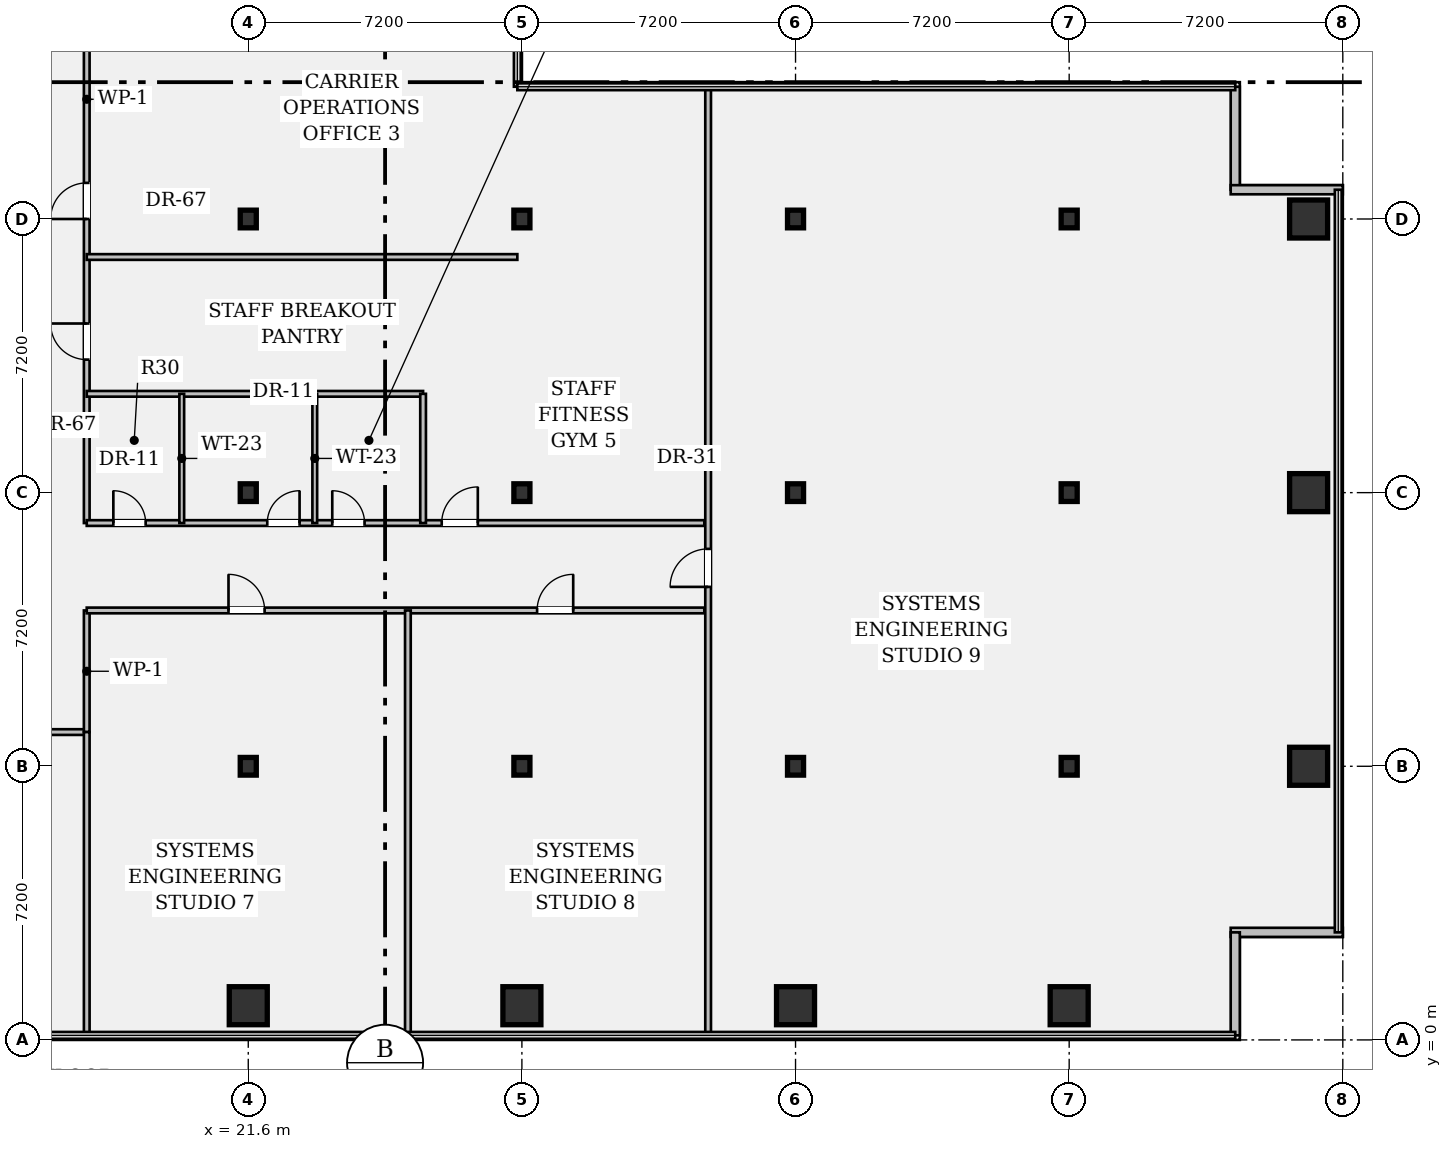
"""IFC4 building model, lengths in metres.
Left out: names, types, materials, properties, quantities, classifications, styles, units other than length and angle.
Written with IfcOpenShell. Run it as: python <this file> out.ifc"""

import sys

from ifc_helpers import new_model, si_unit, direction, frame, frame_2d, origin, origin_2d, place, context, subcontext, project, spatial, rectangle, hollow_rectangle, i_section, extrude, element, fill, save


model = new_model("IFC4")
c1 = context("Model", 3, precision=1e-05, world=origin(), true_north=direction((0.0, 1.0)))
c2 = subcontext(c1, "Body", "Model", "MODEL_VIEW")
j1 = project(units=[si_unit("LENGTHUNIT", "METRE"), si_unit("PLANEANGLEUNIT", "RADIAN")], contexts=[c1])
p1 = place(None, origin())
s1 = spatial("IfcSite", under=j1, at=p1, CompositionType="ELEMENT")
p2 = place(p1, origin())
s2 = spatial("IfcBuilding", under=s1, at=p2, CompositionType="ELEMENT")
p3 = place(p2, frame((0.0, 0.0, 61.95)))
s3 = spatial("IfcBuildingStorey", under=s2, at=p3, CompositionType="ELEMENT", Elevation=61.95)
p4 = place(p3, frame((21.6, 0.9, 0.0), z_axis=(0.0, 0.0, 1.0), x_axis=(1.0, 0.0, 0.0)))
e1 = element("IfcColumn", 1, at=p4, inside=s3, PredefinedType="COLUMN", context=c2, shape_type="SweptSolid", body=[
    extrude(hollow_rectangle(XDim=1.0, YDim=1.0, WallThickness=0.065, at=origin_2d()), origin(), (0.0, 0.0, 1.0), 3.57),
])
for number, where, z_axis, x_axis in (
    (2, (21.6, 7.2, 0.0), (0.0, 0.0, 1.0), (1.0, 0.0, 0.0)),
    (3, (21.6, 14.4, 0.0), (0.0, 0.0, 1.0), (1.0, 0.0, 0.0)),
    (4, (21.6, 21.6, 0.0), (0.0, 0.0, 1.0), (1.0, 0.0, 0.0)),
):
    element("IfcColumn", number, at=place(p3, frame(where, z_axis=z_axis, x_axis=x_axis)), inside=s3, PredefinedType="COLUMN", context=c2, shape_type="SweptSolid", body=[
        extrude(i_section(OverallWidth=0.422, OverallDepth=0.465, WebThickness=0.045, FlangeThickness=0.073, FilletRadius=0.018, at=origin_2d()), origin(), (0.0, 0.0, 1.0), 3.57),
    ])
p5 = place(p3, frame((28.8, 0.9, 0.0), z_axis=(0.0, 0.0, 1.0), x_axis=(1.0, 0.0, 0.0)))
e5 = element("IfcColumn", 5, at=p5, inside=s3, PredefinedType="COLUMN", context=c2, shape_type="SweptSolid", body=[
    extrude(hollow_rectangle(XDim=1.0, YDim=1.0, WallThickness=0.065, at=origin_2d()), origin(), (0.0, 0.0, 1.0), 3.57),
])
for number, where, z_axis, x_axis in (
    (6, (28.8, 7.2, 0.0), (0.0, 0.0, 1.0), (1.0, 0.0, 0.0)),
    (7, (28.8, 14.4, 0.0), (0.0, 0.0, 1.0), (1.0, 0.0, 0.0)),
    (8, (28.8, 21.6, 0.0), (0.0, 0.0, 1.0), (1.0, 0.0, 0.0)),
):
    element("IfcColumn", number, at=place(p3, frame(where, z_axis=z_axis, x_axis=x_axis)), inside=s3, PredefinedType="COLUMN", context=c2, shape_type="SweptSolid", body=[
        extrude(i_section(OverallWidth=0.422, OverallDepth=0.465, WebThickness=0.045, FlangeThickness=0.073, FilletRadius=0.018, at=origin_2d()), origin(), (0.0, 0.0, 1.0), 3.57),
    ])
p6 = place(p3, frame((36.0, 0.9, 0.0), z_axis=(0.0, 0.0, 1.0), x_axis=(1.0, 0.0, 0.0)))
e9 = element("IfcColumn", 9, at=p6, inside=s3, PredefinedType="COLUMN", context=c2, shape_type="SweptSolid", body=[
    extrude(hollow_rectangle(XDim=1.0, YDim=1.0, WallThickness=0.065, at=origin_2d()), origin(), (0.0, 0.0, 1.0), 3.57),
])
for number, where, z_axis, x_axis in (
    (10, (36.0, 7.2, 0.0), (0.0, 0.0, 1.0), (1.0, 0.0, 0.0)),
    (11, (36.0, 14.4, 0.0), (0.0, 0.0, 1.0), (1.0, 0.0, 0.0)),
    (12, (36.0, 21.6, 0.0), (0.0, 0.0, 1.0), (1.0, 0.0, 0.0)),
):
    element("IfcColumn", number, at=place(p3, frame(where, z_axis=z_axis, x_axis=x_axis)), inside=s3, PredefinedType="COLUMN", context=c2, shape_type="SweptSolid", body=[
        extrude(i_section(OverallWidth=0.422, OverallDepth=0.465, WebThickness=0.045, FlangeThickness=0.073, FilletRadius=0.018, at=origin_2d()), origin(), (0.0, 0.0, 1.0), 3.57),
    ])
p7 = place(p3, frame((43.2, 0.9, 0.0), z_axis=(0.0, 0.0, 1.0), x_axis=(1.0, 0.0, 0.0)))
e13 = element("IfcColumn", 13, at=p7, inside=s3, PredefinedType="COLUMN", context=c2, shape_type="SweptSolid", body=[
    extrude(hollow_rectangle(XDim=1.0, YDim=1.0, WallThickness=0.065, at=origin_2d()), origin(), (0.0, 0.0, 1.0), 3.57),
])
for number, where, z_axis, x_axis in (
    (14, (43.2, 7.2, 0.0), (0.0, 0.0, 1.0), (1.0, 0.0, 0.0)),
    (15, (43.2, 14.4, 0.0), (0.0, 0.0, 1.0), (1.0, 0.0, 0.0)),
    (16, (43.2, 21.6, 0.0), (0.0, 0.0, 1.0), (1.0, 0.0, 0.0)),
):
    element("IfcColumn", number, at=place(p3, frame(where, z_axis=z_axis, x_axis=x_axis)), inside=s3, PredefinedType="COLUMN", context=c2, shape_type="SweptSolid", body=[
        extrude(i_section(OverallWidth=0.422, OverallDepth=0.465, WebThickness=0.045, FlangeThickness=0.073, FilletRadius=0.018, at=origin_2d()), origin(), (0.0, 0.0, 1.0), 3.57),
    ])
for number, where, z_axis, x_axis in (
    (17, (49.5, 7.2, 0.0), (0.0, 0.0, 1.0), (1.0, 0.0, 0.0)),
    (18, (49.5, 14.4, 0.0), (0.0, 0.0, 1.0), (1.0, 0.0, 0.0)),
    (19, (49.5, 21.6, 0.0), (0.0, 0.0, 1.0), (1.0, 0.0, 0.0)),
):
    element("IfcColumn", number, at=place(p3, frame(where, z_axis=z_axis, x_axis=x_axis)), inside=s3, PredefinedType="COLUMN", context=c2, shape_type="SweptSolid", body=[
        extrude(hollow_rectangle(XDim=1.0, YDim=1.0, WallThickness=0.065, at=origin_2d()), origin(), (0.0, 0.0, 1.0), 3.57),
    ])
p8 = place(p3, frame((47.57, 25.08, 0.0), z_axis=(0.0, 0.0, 1.0), x_axis=(0.0, -1.0, 0.0)))
e20 = element("IfcWall", 20, at=p8, inside=s3, PredefinedType="STANDARD", context=c2, shape_type="SweptSolid", body=[
    extrude(rectangle(XDim=2.71, YDim=0.24, at=frame_2d((1.355, 0.0))), origin(), (0.0, 0.0, 1.0), 3.57),
])
for number, where, z_axis, x_axis in (
    (21, (47.45, 22.37, 0.0), (0.0, 0.0, 1.0), (1.0, 0.0, 0.0)),
    (22, (50.4, 2.83, 0.0), (0.0, 0.0, 1.0), (-1.0, 0.0, 0.0)),
):
    element("IfcWall", number, at=place(p3, frame(where, z_axis=z_axis, x_axis=x_axis)), inside=s3, PredefinedType="STANDARD", context=c2, shape_type="SweptSolid", body=[
        extrude(rectangle(XDim=2.95, YDim=0.24, at=frame_2d((1.475, 0.0))), origin(), (0.0, 0.0, 1.0), 3.57),
    ])
p9 = place(p3, frame((47.57, 2.83, 0.0), z_axis=(0.0, 0.0, 1.0), x_axis=(0.0, -1.0, 0.0)))
e23 = element("IfcWall", 23, at=p9, inside=s3, PredefinedType="STANDARD", context=c2, shape_type="SweptSolid", body=[
    extrude(rectangle(XDim=2.71, YDim=0.24, at=frame_2d((1.355, 0.0))), origin(), (0.0, 0.0, 1.0), 3.57),
])
p10 = place(p3, frame((14.4, 8.1, 0.0), z_axis=(0.0, 0.0, 1.0), x_axis=(1.0, 0.0, 0.0)))
e24 = element("IfcWall", 24, at=p10, inside=s3, PredefinedType="PARTITIONING", context=c2, shape_type="SweptSolid", body=[
    extrude(rectangle(XDim=2.95, YDim=0.15, at=frame_2d((1.475, 0.0))), origin(), (0.0, 0.0, 1.0), 3.088),
])
p11 = place(p10, frame((0.95, 0.0, 0.0)))
e25 = element("IfcOpeningElement", 25, at=p11, cuts=e24, PredefinedType="OPENING", context=c2, shape_type="SweptSolid", body=[
    extrude(rectangle(XDim=0.95, YDim=2.15, at=frame_2d((0.475, 1.075))), frame((0.0, 0.087, 0.0), z_axis=(0.0, -1.0, 0.0), x_axis=(1.0, 0.0, 0.0)), (0.0, 0.0, 1.0), 0.174),
])
p12 = place(p3, frame((17.35, 8.1, 0.0), z_axis=(0.0, 0.0, 1.0), x_axis=(0.0, 1.0, 0.0)))
e26 = element("IfcWall", 26, at=p12, inside=s3, PredefinedType="PARTITIONING", context=c2, shape_type="SweptSolid", body=[
    extrude(rectangle(XDim=3.2, YDim=0.15, at=frame_2d((1.6, 0.0))), origin(), (0.0, 0.0, 1.0), 3.57),
])
p13 = place(p3, frame((17.35, 13.6, 0.0), z_axis=(0.0, 0.0, 1.0), x_axis=(0.0, 1.0, 0.0)))
e27 = element("IfcWall", 27, at=p13, inside=s3, PredefinedType="PARTITIONING", context=c2, shape_type="SweptSolid", body=[
    extrude(rectangle(XDim=22.3, YDim=0.15, at=frame_2d((11.15, 0.0))), origin(), (0.0, 0.0, 1.0), 2.699),
])
p14 = place(p13, frame((4.3, 0.0, 0.0)))
e28 = element("IfcOpeningElement", 28, at=p14, cuts=e27, PredefinedType="OPENING", context=c2, shape_type="SweptSolid", body=[
    extrude(rectangle(XDim=0.95, YDim=2.15, at=frame_2d((0.475, 1.075))), frame((0.0, 0.087, 0.0), z_axis=(0.0, -1.0, 0.0), x_axis=(1.0, 0.0, 0.0)), (0.0, 0.0, 1.0), 0.174),
])
p15 = place(p13, frame((8.0, 0.0, 0.0)))
e29 = element("IfcOpeningElement", 29, at=p15, cuts=e27, PredefinedType="OPENING", context=c2, shape_type="SweptSolid", body=[
    extrude(rectangle(XDim=0.95, YDim=2.15, at=frame_2d((0.475, 1.075))), frame((0.0, 0.087, 0.0), z_axis=(0.0, -1.0, 0.0), x_axis=(1.0, 0.0, 0.0)), (0.0, 0.0, 1.0), 0.174),
])
p16 = place(p13, frame((15.6, 0.0, 0.0)))
e30 = element("IfcOpeningElement", 30, at=p16, cuts=e27, PredefinedType="OPENING", context=c2, shape_type="SweptSolid", body=[
    extrude(rectangle(XDim=0.95, YDim=2.15, at=frame_2d((0.475, 1.075))), frame((0.0, 0.087, 0.0), z_axis=(0.0, -1.0, 0.0), x_axis=(1.0, 0.0, 0.0)), (0.0, 0.0, 1.0), 0.174),
])
p17 = place(p3, frame((17.35, 11.3, 0.0), z_axis=(0.0, 0.0, 1.0), x_axis=(1.0, 0.0, 0.0)))
e31 = element("IfcWall", 31, at=p17, inside=s3, PredefinedType="PARTITIONING", context=c2, shape_type="SweptSolid", body=[
    extrude(rectangle(XDim=16.25, YDim=0.15, at=frame_2d((8.125, 0.0))), origin(), (0.0, 0.0, 1.0), 2.699),
])
p18 = place(p17, frame((3.73, 0.0, 0.0)))
e32 = element("IfcOpeningElement", 32, at=p18, cuts=e31, PredefinedType="OPENING", context=c2, shape_type="SweptSolid", body=[
    extrude(rectangle(XDim=0.95, YDim=2.15, at=frame_2d((0.475, 1.075))), frame((0.0, 0.087, 0.0), z_axis=(0.0, -1.0, 0.0), x_axis=(1.0, 0.0, 0.0)), (0.0, 0.0, 1.0), 0.174),
])
p19 = place(p17, frame((11.85, 0.0, 0.0)))
e33 = element("IfcOpeningElement", 33, at=p19, cuts=e31, PredefinedType="OPENING", context=c2, shape_type="SweptSolid", body=[
    extrude(rectangle(XDim=0.95, YDim=2.15, at=frame_2d((0.475, 1.075))), frame((0.0, 0.087, 0.0), z_axis=(0.0, -1.0, 0.0), x_axis=(1.0, 0.0, 0.0)), (0.0, 0.0, 1.0), 0.174),
])
p20 = place(p3, frame((17.35, 13.6, 0.0), z_axis=(0.0, 0.0, 1.0), x_axis=(1.0, 0.0, 0.0)))
e34 = element("IfcWall", 34, at=p20, inside=s3, PredefinedType="PARTITIONING", context=c2, shape_type="SweptSolid", body=[
    extrude(rectangle(XDim=16.25, YDim=0.15, at=frame_2d((8.125, 0.0))), origin(), (0.0, 0.0, 1.0), 2.699),
])
p21 = place(p20, frame((0.7, 0.0, 0.0)))
e35 = element("IfcOpeningElement", 35, at=p21, cuts=e34, PredefinedType="OPENING", context=c2, shape_type="SweptSolid", body=[
    extrude(rectangle(XDim=0.85, YDim=2.15, at=frame_2d((0.425, 1.075))), frame((0.0, 0.087, 0.0), z_axis=(0.0, -1.0, 0.0), x_axis=(1.0, 0.0, 0.0)), (0.0, 0.0, 1.0), 0.174),
])
p22 = place(p20, frame((4.75, 0.0, 0.0)))
e36 = element("IfcOpeningElement", 36, at=p22, cuts=e34, PredefinedType="OPENING", context=c2, shape_type="SweptSolid", body=[
    extrude(rectangle(XDim=0.85, YDim=2.15, at=frame_2d((0.425, 1.075))), frame((0.0, 0.087, 0.0), z_axis=(0.0, -1.0, 0.0), x_axis=(1.0, 0.0, 0.0)), (0.0, 0.0, 1.0), 0.174),
])
p23 = place(p20, frame((6.46, 0.0, 0.0)))
e37 = element("IfcOpeningElement", 37, at=p23, cuts=e34, PredefinedType="OPENING", context=c2, shape_type="SweptSolid", body=[
    extrude(rectangle(XDim=0.85, YDim=2.15, at=frame_2d((0.425, 1.075))), frame((0.0, 0.087, 0.0), z_axis=(0.0, -1.0, 0.0), x_axis=(1.0, 0.0, 0.0)), (0.0, 0.0, 1.0), 0.174),
])
p24 = place(p20, frame((9.34, 0.0, 0.0)))
e38 = element("IfcOpeningElement", 38, at=p24, cuts=e34, PredefinedType="OPENING", context=c2, shape_type="SweptSolid", body=[
    extrude(rectangle(XDim=0.95, YDim=2.15, at=frame_2d((0.475, 1.075))), frame((0.0, 0.087, 0.0), z_axis=(0.0, -1.0, 0.0), x_axis=(1.0, 0.0, 0.0)), (0.0, 0.0, 1.0), 0.174),
])
p25 = place(p3, frame((33.7, 0.12, 0.0), z_axis=(0.0, 0.0, 1.0), x_axis=(0.0, 1.0, 0.0)))
e39 = element("IfcWall", 39, at=p25, inside=s3, PredefinedType="PARTITIONING", context=c2, shape_type="SweptSolid", body=[
    extrude(rectangle(XDim=24.96, YDim=0.15, at=frame_2d((12.48, 0.0))), origin(), (0.0, 0.0, 1.0), 2.699),
])
p26 = place(p25, frame((11.8, 0.0, 0.0)))
e40 = element("IfcOpeningElement", 40, at=p26, cuts=e39, PredefinedType="OPENING", context=c2, shape_type="SweptSolid", body=[
    extrude(rectangle(XDim=1.0, YDim=2.15, at=frame_2d((0.5, 1.075))), frame((0.0, 0.087, 0.0), z_axis=(0.0, -1.0, 0.0), x_axis=(1.0, 0.0, 0.0)), (0.0, 0.0, 1.0), 0.174),
])
p27 = place(p3, frame((17.35, 17.0, 0.0), z_axis=(0.0, 0.0, 1.0), x_axis=(1.0, 0.0, 0.0)))
e41 = element("IfcWall", 41, at=p27, inside=s3, PredefinedType="PARTITIONING", context=c2, shape_type="SweptSolid", body=[
    extrude(rectangle(XDim=8.85, YDim=0.15, at=frame_2d((4.425, 0.0))), origin(), (0.0, 0.0, 1.0), 2.699),
])
p28 = place(p3, frame((26.2, 13.6, 0.0), z_axis=(0.0, 0.0, 1.0), x_axis=(0.0, 1.0, 0.0)))
e42 = element("IfcWall", 42, at=p28, inside=s3, PredefinedType="PARTITIONING", context=c2, shape_type="SweptSolid", body=[
    extrude(rectangle(XDim=3.4, YDim=0.15, at=frame_2d((1.7, 0.0))), origin(), (0.0, 0.0, 1.0), 2.699),
])
for number, where, z_axis, x_axis in (
    (43, (19.85, 13.6, 0.0), (0.0, 0.0, 1.0), (0.0, 1.0, 0.0)),
    (44, (23.35, 13.6, 0.0), (0.0, 0.0, 1.0), (0.0, 1.0, 0.0)),
):
    element("IfcWall", number, at=place(p3, frame(where, z_axis=z_axis, x_axis=x_axis)), inside=s3, PredefinedType="PARTITIONING", context=c2, shape_type="SweptSolid", body=[
        extrude(rectangle(XDim=3.4, YDim=0.125, at=frame_2d((1.7, 0.0))), origin(), (0.0, 0.0, 1.0), 2.699),
    ])
p29 = place(p3, frame((17.35, 20.6, 0.0), z_axis=(0.0, 0.0, 1.0), x_axis=(1.0, 0.0, 0.0)))
e45 = element("IfcWall", 45, at=p29, inside=s3, PredefinedType="PARTITIONING", context=c2, shape_type="SweptSolid", body=[
    extrude(rectangle(XDim=11.33, YDim=0.15, at=frame_2d((5.665, 0.0))), origin(), (0.0, 0.0, 1.0), 2.699),
])
p30 = place(p3, frame((17.35, 0.12, 0.0), z_axis=(0.0, 0.0, 1.0), x_axis=(0.0, 1.0, 0.0)))
e46 = element("IfcWall", 46, at=p30, inside=s3, PredefinedType="PARTITIONING", context=c2, shape_type="SweptSolid", body=[
    extrude(rectangle(XDim=7.98, YDim=0.15, at=frame_2d((3.99, 0.0))), origin(), (0.0, 0.0, 1.0), 2.699),
])
p31 = place(p3, frame((25.8, 0.12, 0.0), z_axis=(0.0, 0.0, 1.0), x_axis=(0.0, 1.0, 0.0)))
e47 = element("IfcWall", 47, at=p31, inside=s3, PredefinedType="PARTITIONING", context=c2, shape_type="SweptSolid", body=[
    extrude(rectangle(XDim=11.18, YDim=0.15, at=frame_2d((5.59, 0.0))), origin(), (0.0, 0.0, 1.0), 2.699),
])
p32 = place(p21, origin())
e48 = element("IfcDoor", 48, at=p32, inside=s3, OperationType="SINGLE_SWING_LEFT", PredefinedType="DOOR", context=c2, shape_type="SweptSolid", body=[
    extrude(rectangle(XDim=0.85, YDim=2.15, at=frame_2d((0.425, 1.075))), frame((0.0, 0.025, 0.0), z_axis=(0.0, -1.0, 0.0), x_axis=(1.0, 0.0, 0.0)), (0.0, 0.0, 1.0), 0.05),
])
fill(e35, e48)
p33 = place(p22, origin())
e49 = element("IfcDoor", 49, at=p33, inside=s3, OperationType="SINGLE_SWING_RIGHT", PredefinedType="DOOR", context=c2, shape_type="SweptSolid", body=[
    extrude(rectangle(XDim=0.85, YDim=2.15, at=frame_2d((0.425, 1.075))), frame((0.0, 0.025, 0.0), z_axis=(0.0, -1.0, 0.0), x_axis=(1.0, 0.0, 0.0)), (0.0, 0.0, 1.0), 0.05),
])
fill(e36, e49)
p34 = place(p23, origin())
e50 = element("IfcDoor", 50, at=p34, inside=s3, OperationType="SINGLE_SWING_LEFT", PredefinedType="DOOR", context=c2, shape_type="SweptSolid", body=[
    extrude(rectangle(XDim=0.85, YDim=2.15, at=frame_2d((0.425, 1.075))), frame((0.0, 0.025, 0.0), z_axis=(0.0, -1.0, 0.0), x_axis=(1.0, 0.0, 0.0)), (0.0, 0.0, 1.0), 0.05),
])
fill(e37, e50)
p35 = place(p14, origin())
e51 = element("IfcDoor", 51, at=p35, inside=s3, OperationType="SINGLE_SWING_RIGHT", PredefinedType="DOOR", context=c2, shape_type="SweptSolid", body=[
    extrude(rectangle(XDim=0.95, YDim=2.15, at=frame_2d((0.475, 1.075))), frame((0.0, 0.025, 0.0), z_axis=(0.0, -1.0, 0.0), x_axis=(1.0, 0.0, 0.0)), (0.0, 0.0, 1.0), 0.05),
])
fill(e28, e51)
p36 = place(p15, origin())
e52 = element("IfcDoor", 52, at=p36, inside=s3, OperationType="SINGLE_SWING_LEFT", PredefinedType="DOOR", context=c2, shape_type="SweptSolid", body=[
    extrude(rectangle(XDim=0.95, YDim=2.15, at=frame_2d((0.475, 1.075))), frame((0.0, 0.025, 0.0), z_axis=(0.0, -1.0, 0.0), x_axis=(1.0, 0.0, 0.0)), (0.0, 0.0, 1.0), 0.05),
])
fill(e29, e52)
p37 = place(p24, origin())
e53 = element("IfcDoor", 53, at=p37, inside=s3, OperationType="SINGLE_SWING_RIGHT", PredefinedType="DOOR", context=c2, shape_type="SweptSolid", body=[
    extrude(rectangle(XDim=0.95, YDim=2.15, at=frame_2d((0.475, 1.075))), frame((0.0, 0.025, 0.0), z_axis=(0.0, -1.0, 0.0), x_axis=(1.0, 0.0, 0.0)), (0.0, 0.0, 1.0), 0.05),
])
fill(e38, e53)
p38 = place(p18, origin())
e54 = element("IfcDoor", 54, at=p38, inside=s3, OperationType="SINGLE_SWING_LEFT", PredefinedType="DOOR", context=c2, shape_type="SweptSolid", body=[
    extrude(rectangle(XDim=0.95, YDim=2.15, at=frame_2d((0.475, 1.075))), frame((0.0, 0.025, 0.0), z_axis=(0.0, -1.0, 0.0), x_axis=(1.0, 0.0, 0.0)), (0.0, 0.0, 1.0), 0.05),
])
fill(e32, e54)
p39 = place(p19, origin())
e55 = element("IfcDoor", 55, at=p39, inside=s3, OperationType="SINGLE_SWING_RIGHT", PredefinedType="DOOR", context=c2, shape_type="SweptSolid", body=[
    extrude(rectangle(XDim=0.95, YDim=2.15, at=frame_2d((0.475, 1.075))), frame((0.0, 0.025, 0.0), z_axis=(0.0, -1.0, 0.0), x_axis=(1.0, 0.0, 0.0)), (0.0, 0.0, 1.0), 0.05),
])
fill(e33, e55)
p40 = place(p26, origin())
e56 = element("IfcDoor", 56, at=p40, inside=s3, OperationType="SINGLE_SWING_LEFT", PredefinedType="DOOR", context=c2, shape_type="SweptSolid", body=[
    extrude(rectangle(XDim=1.0, YDim=2.15, at=frame_2d((0.5, 1.075))), frame((0.0, 0.025, 0.0), z_axis=(0.0, -1.0, 0.0), x_axis=(1.0, 0.0, 0.0)), (0.0, 0.0, 1.0), 0.05),
])
fill(e40, e56)
save(model, sys.argv[1])
